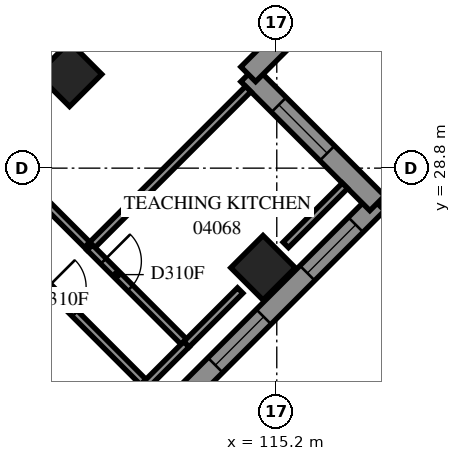
"""IFC4 building model, lengths in metres.
Left out: names, types, materials, properties, quantities, classifications, styles, units other than length and angle.
Written with IfcOpenShell. Run it as: python <this file> out.ifc"""

import sys

from ifc_helpers import new_model, si_unit, direction, frame, frame_2d, origin, origin_2d, place, context, subcontext, project, spatial, polyline, rectangle, outline, extrude, element, fill, save


model = new_model("IFC4")
c1 = context("Model", 3, precision=1e-05, world=origin(), true_north=direction((0.0, 1.0)))
c2 = subcontext(c1, "Body", "Model", "MODEL_VIEW")
j1 = project(units=[si_unit("LENGTHUNIT", "METRE"), si_unit("PLANEANGLEUNIT", "RADIAN")], contexts=[c1])
p1 = place(None, origin())
s1 = spatial("IfcSite", under=j1, at=p1, CompositionType="ELEMENT")
p2 = place(p1, origin())
s2 = spatial("IfcBuilding", under=s1, at=p2, CompositionType="ELEMENT")
p3 = place(p2, frame((0.0, 0.0, 18.6)))
s3 = spatial("IfcBuildingStorey", under=s2, at=p3, CompositionType="ELEMENT", Elevation=18.6)
for number, where, z_axis, x_axis in (
    (1, (109.747, 31.271, 0.0), (0.0, 0.0, 1.0), (0.707, -0.707, 0.0)),
    (2, (114.838, 26.18, 0.0), (0.0, 0.0, 1.0), (0.707, -0.707, 0.0)),
):
    element("IfcColumn", number, at=place(p3, frame(where, z_axis=z_axis, x_axis=x_axis)), inside=s3, PredefinedType="COLUMN", context=c2, shape_type="SweptSolid", body=[
        extrude(rectangle(XDim=1.2, YDim=1.2, at=origin_2d()), origin(), (0.0, 0.0, 1.0), 3.8),
    ])
p4 = place(p3, frame((104.656, 14.689, 0.0), z_axis=(0.0, 0.0, 1.0), x_axis=(0.7071094621, 0.7071041002, 0.0)))
e3 = element("IfcWall", 3, at=p4, inside=s3, PredefinedType="SOLIDWALL", context=c2, shape_type="SweptSolid", body=[
    extrude(outline(polyline([(-0.275, -0.275), (18.925, -0.275), (18.375, 0.275), (0.275, 0.275), (-0.275, -0.275)])), origin(), (0.0, 0.0, 1.0), 3.8),
])
p5 = place(p4, frame((1.825, 0.0, 0.7)))
e4 = element("IfcOpeningElement", 4, at=p5, cuts=e3, PredefinedType="OPENING", context=c2, shape_type="SweptSolid", body=[
    extrude(rectangle(XDim=1.8, YDim=2.4, at=frame_2d((0.9, 1.2))), frame((0.0, 0.285, 0.0), z_axis=(0.0, -1.0, 0.0), x_axis=(1.0, 0.0, 0.0)), (0.0, 0.0, 1.0), 0.57),
])
p6 = place(p4, frame((5.425, 0.0, 0.7)))
e5 = element("IfcOpeningElement", 5, at=p6, cuts=e3, PredefinedType="OPENING", context=c2, shape_type="SweptSolid", body=[
    extrude(rectangle(XDim=1.8, YDim=2.4, at=frame_2d((0.9, 1.2))), frame((0.0, 0.285, 0.0), z_axis=(0.0, -1.0, 0.0), x_axis=(1.0, 0.0, 0.0)), (0.0, 0.0, 1.0), 0.57),
])
p7 = place(p4, frame((9.025, 0.0, 0.7)))
e6 = element("IfcOpeningElement", 6, at=p7, cuts=e3, PredefinedType="OPENING", context=c2, shape_type="SweptSolid", body=[
    extrude(rectangle(XDim=1.8, YDim=2.4, at=frame_2d((0.9, 1.2))), frame((0.0, 0.285, 0.0), z_axis=(0.0, -1.0, 0.0), x_axis=(1.0, 0.0, 0.0)), (0.0, 0.0, 1.0), 0.57),
])
p8 = place(p4, frame((12.625, 0.0, 0.7)))
e7 = element("IfcOpeningElement", 7, at=p8, cuts=e3, PredefinedType="OPENING", context=c2, shape_type="SweptSolid", body=[
    extrude(rectangle(XDim=1.8, YDim=2.4, at=frame_2d((0.9, 1.2))), frame((0.0, 0.285, 0.0), z_axis=(0.0, -1.0, 0.0), x_axis=(1.0, 0.0, 0.0)), (0.0, 0.0, 1.0), 0.57),
])
p9 = place(p4, frame((16.05, 0.0, 0.7)))
e8 = element("IfcOpeningElement", 8, at=p9, cuts=e3, PredefinedType="OPENING", context=c2, shape_type="SweptSolid", body=[
    extrude(rectangle(XDim=1.8, YDim=2.4, at=frame_2d((0.9, 1.2))), frame((0.0, 0.285, 0.0), z_axis=(0.0, -1.0, 0.0), x_axis=(1.0, 0.0, 0.0)), (0.0, 0.0, 1.0), 0.57),
])
p10 = place(p3, frame((117.843, 27.877, 0.0), z_axis=(0.0, 0.0, 1.0), x_axis=(-0.7071067812, 0.7071067812, 0.0)))
e9 = element("IfcWall", 9, at=p10, inside=s3, PredefinedType="SOLIDWALL", context=c2, shape_type="SweptSolid", body=[
    extrude(outline(polyline([(-0.275, -0.275), (4.525, -0.275), (5.075, 0.275), (0.275, 0.275), (-0.275, -0.275)])), origin(), (0.0, 0.0, 1.0), 3.8),
])
p11 = place(p10, frame((1.863, 0.0, 0.7)))
e10 = element("IfcOpeningElement", 10, at=p11, cuts=e9, PredefinedType="OPENING", context=c2, shape_type="SweptSolid", body=[
    extrude(rectangle(XDim=1.8, YDim=2.4, at=frame_2d((0.9, 1.2))), frame((0.0, 0.285, 0.0), z_axis=(0.0, -1.0, 0.0), x_axis=(1.0, 0.0, 0.0)), (0.0, 0.0, 1.0), 0.57),
])
p12 = place(p3, frame((114.449, 31.271, 0.0), z_axis=(0.0, 0.0, 1.0), x_axis=(0.7070963646, 0.7071171977, 0.0)))
e11 = element("IfcWall", 11, at=p12, inside=s3, PredefinedType="SOLIDWALL", context=c2, shape_type="SweptSolid", body=[
    extrude(outline(polyline([(0.275, -0.275), (5.075, -0.275), (4.525, 0.275), (-0.275, 0.275), (0.275, -0.275)])), origin(), (0.0, 0.0, 1.0), 3.8),
])
p13 = place(p12, frame((1.137, 0.0, 0.7)))
e12 = element("IfcOpeningElement", 12, at=p13, cuts=e11, PredefinedType="OPENING", context=c2, shape_type="SweptSolid", body=[
    extrude(rectangle(XDim=1.8, YDim=2.4, at=frame_2d((0.9, 1.2))), frame((0.0, 0.285, 0.0), z_axis=(0.0, -1.0, 0.0), x_axis=(1.0, 0.0, 0.0)), (0.0, 0.0, 1.0), 0.57),
])
p14 = place(p3, frame((93.163, 41.697, 0.0), z_axis=(0.0, 0.0, 1.0), x_axis=(0.7071067812, -0.7071067812, 0.0)))
e13 = element("IfcWall", 13, at=p14, inside=s3, PredefinedType="PARTITIONING", context=c2, shape_type="SweptSolid", body=[
    extrude(rectangle(XDim=26.299, YDim=0.2, at=frame_2d((13.149, 0.0))), origin(), (0.0, 0.0, 1.0), 3.8),
])
p15 = place(p14, frame((3.437, 0.0, 0.0)))
e14 = element("IfcOpeningElement", 14, at=p15, cuts=e13, PredefinedType="OPENING", context=c2, shape_type="SweptSolid", body=[
    extrude(rectangle(XDim=1.0, YDim=2.1, at=frame_2d((0.5, 1.05))), frame((0.0, 0.11, 0.0), z_axis=(0.0, -1.0, 0.0), x_axis=(1.0, 0.0, 0.0)), (0.0, 0.0, 1.0), 0.22),
])
p16 = place(p14, frame((10.637, 0.0, 0.0)))
e15 = element("IfcOpeningElement", 15, at=p16, cuts=e13, PredefinedType="OPENING", context=c2, shape_type="SweptSolid", body=[
    extrude(rectangle(XDim=1.0, YDim=2.1, at=frame_2d((0.5, 1.05))), frame((0.0, 0.11, 0.0), z_axis=(0.0, -1.0, 0.0), x_axis=(1.0, 0.0, 0.0)), (0.0, 0.0, 1.0), 0.22),
])
p17 = place(p14, frame((16.024, 0.0, 0.0)))
e16 = element("IfcOpeningElement", 16, at=p17, cuts=e13, PredefinedType="OPENING", context=c2, shape_type="SweptSolid", body=[
    extrude(rectangle(XDim=1.0, YDim=2.1, at=frame_2d((0.5, 1.05))), frame((0.0, 0.11, 0.0), z_axis=(0.0, -1.0, 0.0), x_axis=(1.0, 0.0, 0.0)), (0.0, 0.0, 1.0), 0.22),
])
p18 = place(p14, frame((22.657, 0.0, 0.0)))
e17 = element("IfcOpeningElement", 17, at=p18, cuts=e13, PredefinedType="OPENING", context=c2, shape_type="SweptSolid", body=[
    extrude(rectangle(XDim=1.0, YDim=2.1, at=frame_2d((0.5, 1.05))), frame((0.0, 0.11, 0.0), z_axis=(0.0, -1.0, 0.0), x_axis=(1.0, 0.0, 0.0)), (0.0, 0.0, 1.0), 0.22),
])
p19 = place(p3, frame((110.281, 26.713, 0.0), z_axis=(0.0, 0.0, 1.0), x_axis=(-0.7072363947, 0.7069771439, 0.0)))
e18 = element("IfcWall", 18, at=p19, inside=s3, PredefinedType="PARTITIONING", context=c2, shape_type="SweptSolid", body=[
    extrude(rectangle(XDim=10.8, YDim=0.2, at=frame_2d((5.4, 0.0))), origin(), (0.0, 0.0, 1.0), 3.8),
])
p20 = place(p19, frame((3.827, 0.0, 0.0)))
e19 = element("IfcOpeningElement", 19, at=p20, cuts=e18, PredefinedType="OPENING", context=c2, shape_type="SweptSolid", body=[
    extrude(rectangle(XDim=1.0, YDim=2.1, at=frame_2d((0.5, 1.05))), frame((0.0, 0.11, 0.0), z_axis=(0.0, -1.0, 0.0), x_axis=(1.0, 0.0, 0.0)), (0.0, 0.0, 1.0), 0.22),
])
p21 = place(p3, frame((105.186, 31.802, 0.0), z_axis=(0.0, 0.0, 1.0), x_axis=(0.707102108, 0.7071114543, 0.0)))
e20 = element("IfcWall", 20, at=p21, inside=s3, PredefinedType="PARTITIONING", context=c2, shape_type="SweptSolid", body=[
    extrude(rectangle(XDim=10.699, YDim=0.2, at=frame_2d((5.35, 0.0))), origin(), (0.0, 0.0, 1.0), 3.8),
])
p22 = place(p3, frame((110.277, 26.711, 0.0), z_axis=(0.0, 0.0, 1.0), x_axis=(0.7071067812, 0.7071067812, 0.0)))
e21 = element("IfcWall", 21, at=p22, inside=s3, PredefinedType="PARTITIONING", context=c2, shape_type="SweptSolid", body=[
    extrude(rectangle(XDim=5.899, YDim=0.2, at=frame_2d((2.95, 0.0))), origin(), (0.0, 0.0, 1.0), 3.8),
])
p23 = place(p3, frame((110.279, 26.711, 0.0), z_axis=(0.0, 0.0, 1.0), x_axis=(0.7068288851, -0.7073845681, 0.0)))
e22 = element("IfcWall", 22, at=p23, inside=s3, PredefinedType="PARTITIONING", context=c2, shape_type="SweptSolid", body=[
    extrude(rectangle(XDim=3.599, YDim=0.2, at=frame_2d((1.8, 0.0))), origin(), (0.0, 0.0, 1.0), 3.8),
])
p24 = place(p23, frame((0.507, 0.0, 0.0)))
e23 = element("IfcOpeningElement", 23, at=p24, cuts=e22, PredefinedType="OPENING", context=c2, shape_type="SweptSolid", body=[
    extrude(rectangle(XDim=1.0, YDim=2.1, at=frame_2d((0.5, 1.05))), frame((0.0, 0.11, 0.0), z_axis=(0.0, -1.0, 0.0), x_axis=(1.0, 0.0, 0.0)), (0.0, 0.0, 1.0), 0.22),
])
p25 = place(p3, frame((115.438, 26.78, 0.0), z_axis=(0.0, 0.0, 1.0), x_axis=(0.7071067812, 0.7071067812, 0.0)))
e24 = element("IfcWall", 24, at=p25, inside=s3, PredefinedType="PARTITIONING", context=c2, shape_type="SweptSolid", body=[
    extrude(rectangle(XDim=2.201, YDim=0.2, at=frame_2d((1.101, 0.0))), origin(), (0.0, 0.0, 1.0), 3.8),
])
p26 = place(p3, frame((112.822, 24.165, 0.0), z_axis=(0.0, 0.0, 1.0), x_axis=(0.7071067812, 0.7071067812, 0.0)))
e25 = element("IfcWall", 25, at=p26, inside=s3, PredefinedType="PARTITIONING", context=c2, shape_type="SweptSolid", body=[
    extrude(rectangle(XDim=2.002, YDim=0.2, at=frame_2d((1.001, 0.0))), origin(), (0.0, 0.0, 1.0), 3.2),
])
p27 = place(p3, frame((111.761, 23.105, 0.0), z_axis=(0.0, 0.0, 1.0), x_axis=(0.7071067812, 0.7071067812, 0.0)))
e26 = element("IfcWall", 26, at=p27, inside=s3, PredefinedType="PARTITIONING", context=c2, shape_type="SweptSolid", body=[
    extrude(rectangle(XDim=1.499, YDim=0.2, at=frame_2d((0.75, 0.0))), origin(), (0.0, 0.0, 1.0), 3.2),
])
p28 = place(p8, origin())
e27 = element("IfcWindow", 27, at=p28, inside=s3, PartitioningType="SINGLE_PANEL", PredefinedType="WINDOW", context=c2, shape_type="SweptSolid", body=[
    extrude(rectangle(XDim=1.8, YDim=2.4, at=frame_2d((0.9, 1.2))), frame((0.0, 0.155, 0.0), z_axis=(0.0, -1.0, 0.0), x_axis=(1.0, 0.0, 0.0)), (0.0, 0.0, 1.0), 0.06),
])
fill(e7, e27)
p29 = place(p9, origin())
e28 = element("IfcWindow", 28, at=p29, inside=s3, PartitioningType="SINGLE_PANEL", PredefinedType="WINDOW", context=c2, shape_type="SweptSolid", body=[
    extrude(rectangle(XDim=1.8, YDim=2.4, at=frame_2d((0.9, 1.2))), frame((0.0, 0.155, 0.0), z_axis=(0.0, -1.0, 0.0), x_axis=(1.0, 0.0, 0.0)), (0.0, 0.0, 1.0), 0.06),
])
fill(e8, e28)
p30 = place(p11, origin())
e29 = element("IfcWindow", 29, at=p30, inside=s3, PartitioningType="SINGLE_PANEL", PredefinedType="WINDOW", context=c2, shape_type="SweptSolid", body=[
    extrude(rectangle(XDim=1.8, YDim=2.4, at=frame_2d((0.9, 1.2))), frame((0.0, 0.155, 0.0), z_axis=(0.0, -1.0, 0.0), x_axis=(1.0, 0.0, 0.0)), (0.0, 0.0, 1.0), 0.06),
])
fill(e10, e29)
p31 = place(p18, origin())
e30 = element("IfcDoor", 30, at=p31, inside=s3, OperationType="SINGLE_SWING_RIGHT", PredefinedType="DOOR", context=c2, shape_type="SweptSolid", body=[
    extrude(rectangle(XDim=1.0, YDim=2.1, at=frame_2d((0.5, 1.05))), frame((0.0, 0.025, 0.0), z_axis=(0.0, -1.0, 0.0), x_axis=(1.0, 0.0, 0.0)), (0.0, 0.0, 1.0), 0.05),
])
fill(e17, e30)
p32 = place(p24, origin())
e31 = element("IfcDoor", 31, at=p32, inside=s3, OperationType="SINGLE_SWING_RIGHT", PredefinedType="DOOR", context=c2, shape_type="SweptSolid", body=[
    extrude(rectangle(XDim=1.0, YDim=2.1, at=frame_2d((0.5, 1.05))), frame((0.0, 0.025, 0.0), z_axis=(0.0, -1.0, 0.0), x_axis=(1.0, 0.0, 0.0)), (0.0, 0.0, 1.0), 0.05),
])
fill(e23, e31)
save(model, sys.argv[1])
